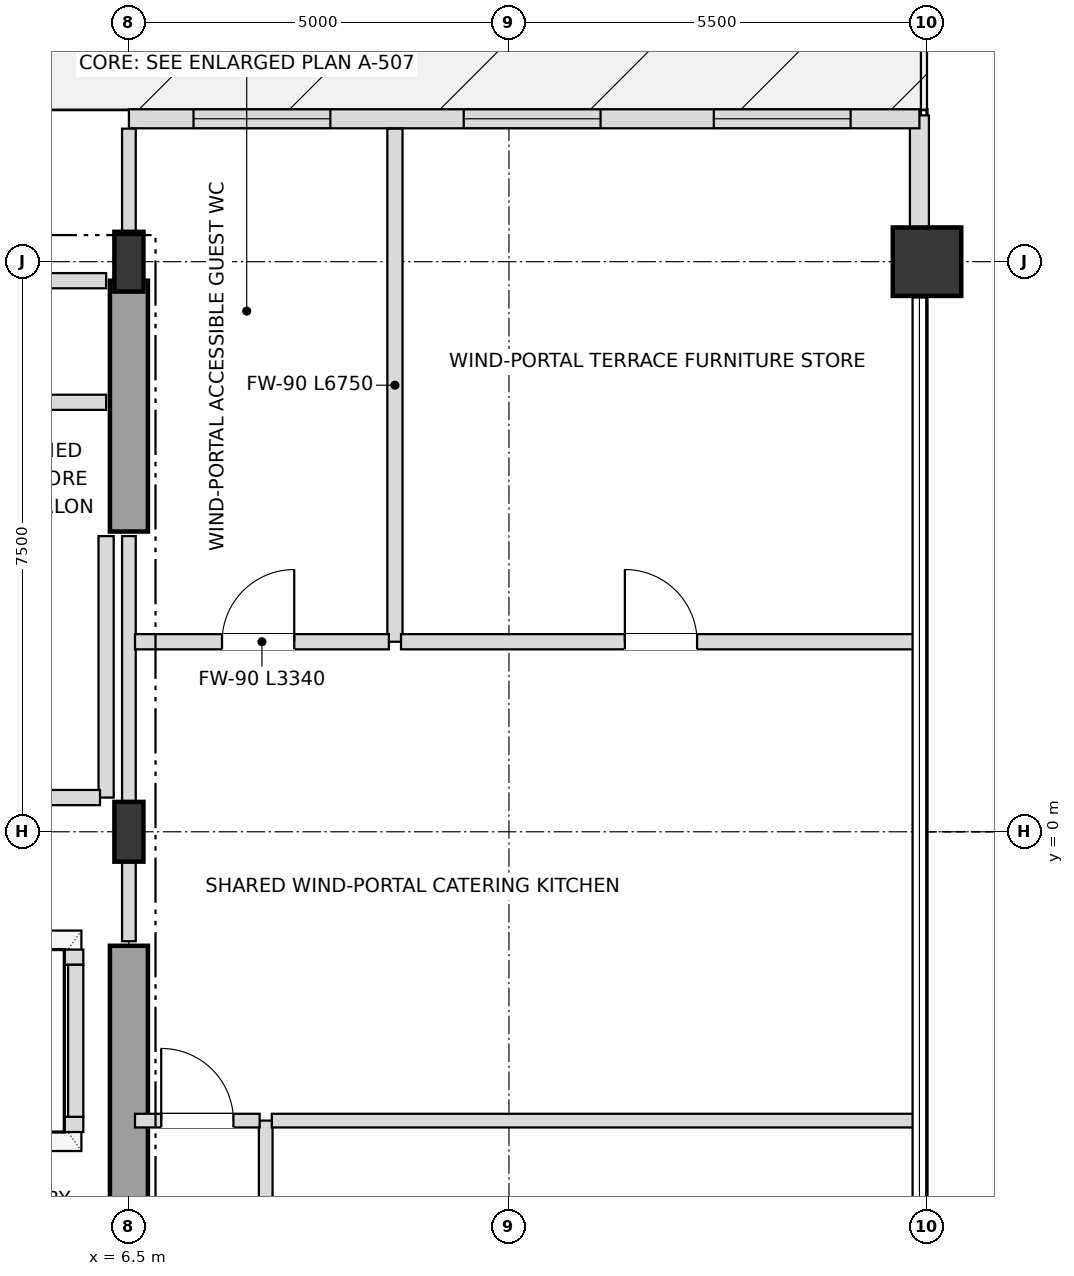
"""IFC4 building model, lengths in metres.
Left out: names, types, materials, properties, quantities, classifications, styles, units other than length and angle.
Written with IfcOpenShell. Run it as: python <this file> out.ifc"""

import sys

from ifc_helpers import new_model, si_unit, direction, frame, frame_2d, origin, origin_2d, place, context, subcontext, project, spatial, rectangle, i_section, extrude, element, fill, save


model = new_model("IFC4")
c1 = context("Model", 3, precision=1e-05, world=origin(), true_north=direction((0.0, 1.0)))
c2 = subcontext(c1, "Body", "Model", "MODEL_VIEW")
j1 = project(units=[si_unit("LENGTHUNIT", "METRE"), si_unit("PLANEANGLEUNIT", "RADIAN")], contexts=[c1])
p1 = place(None, origin())
s1 = spatial("IfcSite", under=j1, at=p1, CompositionType="ELEMENT")
p2 = place(p1, origin())
s2 = spatial("IfcBuilding", under=s1, at=p2, CompositionType="ELEMENT")
p3 = place(p2, frame((0.0, 0.0, 261.9)))
s3 = spatial("IfcBuildingStorey", under=s2, at=p3, CompositionType="ELEMENT", Elevation=261.9)
for number, where, z_axis, x_axis in (
    (1, (6.5, 0.0, 0.0), (0.0, 0.0, 1.0), (1.0, 0.0, 0.0)),
    (2, (6.5, 7.5, 0.0), (0.0, 0.0, 1.0), (1.0, 0.0, 0.0)),
):
    element("IfcColumn", number, at=place(p3, frame(where, z_axis=z_axis, x_axis=x_axis)), inside=s3, PredefinedType="COLUMN", context=c2, shape_type="SweptSolid", body=[
        extrude(i_section(OverallWidth=0.382, OverallDepth=0.786, WebThickness=0.02, FlangeThickness=0.033, at=origin_2d()), origin(), (0.0, 0.0, 1.0), 3.6),
    ])
p4 = place(p3, frame((17.0, 7.5, 0.0), z_axis=(0.0, 0.0, 1.0), x_axis=(1.0, 0.0, 0.0)))
e3 = element("IfcColumn", 3, at=p4, inside=s3, PredefinedType="USERDEFINED", context=c2, shape_type="SweptSolid", body=[
    extrude(rectangle(XDim=0.9, YDim=0.9, at=origin_2d()), origin(), (0.0, 0.0, 1.0), 3.6),
])
p5 = place(p3, frame((16.9, 7.945, 0.0), z_axis=(0.0, 0.0, 1.0), x_axis=(0.0, 1.0, 0.0)))
e4 = element("IfcWall", 4, at=p5, inside=s3, PredefinedType="SOLIDWALL", context=c2, shape_type="SweptSolid", body=[
    extrude(rectangle(XDim=1.48, YDim=0.25, at=frame_2d((0.74, 0.0))), origin(), (0.0, 0.0, 1.0), 2.748),
])
p6 = place(p3, frame((6.5, 9.38, 0.0), z_axis=(0.0, 0.0, 1.0), x_axis=(1.0, 0.0, 0.0)))
e5 = element("IfcWall", 5, at=p6, inside=s3, PredefinedType="SOLIDWALL", context=c2, shape_type="SweptSolid", body=[
    extrude(rectangle(XDim=10.4, YDim=0.25, at=frame_2d((5.2, 0.0))), origin(), (0.0, 0.0, 1.0), 3.38),
])
p7 = place(p6, frame((0.85, 0.0, 0.72)))
e6 = element("IfcOpeningElement", 6, at=p7, cuts=e5, PredefinedType="OPENING", context=c2, shape_type="SweptSolid", body=[
    extrude(rectangle(XDim=1.8, YDim=1.68, at=frame_2d((0.9, 0.84))), frame((0.0, 0.135, 0.0), z_axis=(0.0, -1.0, 0.0), x_axis=(1.0, 0.0, 0.0)), (0.0, 0.0, 1.0), 0.27),
])
p8 = place(p6, frame((4.405, 0.0, 0.72)))
e7 = element("IfcOpeningElement", 7, at=p8, cuts=e5, PredefinedType="OPENING", context=c2, shape_type="SweptSolid", body=[
    extrude(rectangle(XDim=1.8, YDim=1.68, at=frame_2d((0.9, 0.84))), frame((0.0, 0.135, 0.0), z_axis=(0.0, -1.0, 0.0), x_axis=(1.0, 0.0, 0.0)), (0.0, 0.0, 1.0), 0.27),
])
p9 = place(p6, frame((7.695, 0.0, 0.72)))
e8 = element("IfcOpeningElement", 8, at=p9, cuts=e5, PredefinedType="OPENING", context=c2, shape_type="SweptSolid", body=[
    extrude(rectangle(XDim=1.8, YDim=1.68, at=frame_2d((0.9, 0.84))), frame((0.0, 0.135, 0.0), z_axis=(0.0, -1.0, 0.0), x_axis=(1.0, 0.0, 0.0)), (0.0, 0.0, 1.0), 0.27),
])
p10 = place(p3, frame((6.5, -7.25, 0.0), z_axis=(0.0, 0.0, 1.0), x_axis=(0.0, 1.0, 0.0)))
e9 = element("IfcWall", 9, at=p10, inside=s3, PredefinedType="SHEAR", context=c2, shape_type="SweptSolid", body=[
    extrude(rectangle(XDim=5.75, YDim=0.5, at=frame_2d((2.875, 0.0))), origin(), (0.0, 0.0, 1.0), 3.38),
])
p11 = place(p10, frame((0.85, 0.0, 0.0)))
e10 = element("IfcOpeningElement", 10, at=p11, cuts=e9, PredefinedType="OPENING", context=c2, shape_type="SweptSolid", body=[
    extrude(rectangle(XDim=1.05, YDim=2.15, at=frame_2d((0.525, 1.075))), frame((0.0, 0.26, 0.0), z_axis=(0.0, -1.0, 0.0), x_axis=(1.0, 0.0, 0.0)), (0.0, 0.0, 1.0), 0.52),
])
p12 = place(p3, frame((6.5, 3.95, 0.0), z_axis=(0.0, 0.0, 1.0), x_axis=(0.0, 1.0, 0.0)))
e11 = element("IfcWall", 11, at=p12, inside=s3, PredefinedType="SHEAR", context=c2, shape_type="SweptSolid", body=[
    extrude(rectangle(XDim=3.3, YDim=0.5, at=frame_2d((1.65, 0.0))), origin(), (0.0, 0.0, 1.0), 3.38),
])
p13 = place(p3, frame((1.8, -3.85, 0.0), z_axis=(0.0, 0.0, 1.0), x_axis=(1.0, 0.0, 0.0)))
e12 = element("IfcWall", 12, at=p13, inside=s3, PredefinedType="SOLIDWALL", context=c2, shape_type="SweptSolid", body=[
    extrude(rectangle(XDim=4.1, YDim=0.2, at=frame_2d((2.05, 0.0))), origin(), (0.0, 0.0, 1.0), 3.38),
])
p14 = place(p13, frame((0.45, 0.0, 0.0)))
e13 = element("IfcOpeningElement", 13, at=p14, cuts=e12, PredefinedType="OPENING", context=c2, shape_type="SweptSolid", body=[
    extrude(rectangle(XDim=1.2, YDim=2.2, at=frame_2d((0.6, 1.1))), frame((0.0, 0.11, 0.0), z_axis=(0.0, -1.0, 0.0), x_axis=(1.0, 0.0, 0.0)), (0.0, 0.0, 1.0), 0.22),
])
p15 = place(p13, frame((2.45, 0.0, 0.0)))
e14 = element("IfcOpeningElement", 14, at=p15, cuts=e12, PredefinedType="OPENING", context=c2, shape_type="SweptSolid", body=[
    extrude(rectangle(XDim=1.2, YDim=2.2, at=frame_2d((0.6, 1.1))), frame((0.0, 0.11, 0.0), z_axis=(0.0, -1.0, 0.0), x_axis=(1.0, 0.0, 0.0)), (0.0, 0.0, 1.0), 0.22),
])
p16 = place(p3, frame((1.8, -1.65, 0.0), z_axis=(0.0, 0.0, 1.0), x_axis=(1.0, 0.0, 0.0)))
e15 = element("IfcWall", 15, at=p16, inside=s3, PredefinedType="SOLIDWALL", context=c2, shape_type="SweptSolid", body=[
    extrude(rectangle(XDim=4.1, YDim=0.2, at=frame_2d((2.05, 0.0))), origin(), (0.0, 0.0, 1.0), 3.38),
])
p17 = place(p3, frame((5.8, -3.75, 0.0), z_axis=(0.0, 0.0, 1.0), x_axis=(0.0, 1.0, 0.0)))
e16 = element("IfcWall", 16, at=p17, inside=s3, PredefinedType="SOLIDWALL", context=c2, shape_type="SweptSolid", body=[
    extrude(rectangle(XDim=2.0, YDim=0.2, at=frame_2d((1.0, 0.0))), origin(), (0.0, 0.0, 1.0), 3.38),
])
p18 = place(p3, frame((6.2, 0.45, 0.0), z_axis=(0.0, 0.0, 1.0), x_axis=(0.0, 1.0, 0.0)))
e17 = element("IfcWall", 17, at=p18, inside=s3, PredefinedType="SOLIDWALL", context=c2, shape_type="SweptSolid", body=[
    extrude(rectangle(XDim=3.44, YDim=0.2, at=frame_2d((1.72, 0.0))), origin(), (0.0, 0.0, 1.0), 3.38),
])
p19 = place(p3, frame((6.5, -1.44, 0.0), z_axis=(0.0, 0.0, 1.0), x_axis=(0.0, 1.0, 0.0)))
e18 = element("IfcWall", 18, at=p19, inside=s3, PredefinedType="PARTITIONING", context=c2, shape_type="SweptSolid", body=[
    extrude(rectangle(XDim=5.33, YDim=0.18, at=frame_2d((2.665, 0.0))), origin(), (0.0, 0.0, 1.0), 2.826),
])
p20 = place(p3, frame((6.5, 7.31, 0.0), z_axis=(0.0, 0.0, 1.0), x_axis=(0.0, 1.0, 0.0)))
e19 = element("IfcWall", 19, at=p20, inside=s3, PredefinedType="PARTITIONING", context=c2, shape_type="SweptSolid", body=[
    extrude(rectangle(XDim=1.94, YDim=0.18, at=frame_2d((0.97, 0.0))), origin(), (0.0, 0.0, 1.0), 2.826),
])
p21 = place(p3, frame((8.3, -9.2, 0.0), z_axis=(0.0, 0.0, 1.0), x_axis=(0.0, 1.0, 0.0)))
e20 = element("IfcWall", 20, at=p21, inside=s3, PredefinedType="PARTITIONING", context=c2, shape_type="SweptSolid", body=[
    extrude(rectangle(XDim=5.4, YDim=0.18, at=frame_2d((2.7, 0.0))), origin(), (0.0, 0.0, 1.0), 2.826),
])
p22 = place(p21, frame((3.125, 0.0, 0.0)))
e21 = element("IfcOpeningElement", 21, at=p22, cuts=e20, PredefinedType="OPENING", context=c2, shape_type="SweptSolid", body=[
    extrude(rectangle(XDim=0.95, YDim=2.15, at=frame_2d((0.475, 1.075))), frame((0.0, 0.1, 0.0), z_axis=(0.0, -1.0, 0.0), x_axis=(1.0, 0.0, 0.0)), (0.0, 0.0, 1.0), 0.2),
])
p23 = place(p3, frame((10.0, 2.5, 0.0), z_axis=(0.0, 0.0, 1.0), x_axis=(0.0, 1.0, 0.0)))
e22 = element("IfcWall", 22, at=p23, inside=s3, PredefinedType="SOLIDWALL", context=c2, shape_type="SweptSolid", body=[
    extrude(rectangle(XDim=6.75, YDim=0.2, at=frame_2d((3.375, 0.0))), origin(), (0.0, 0.0, 1.0), 2.826),
])
p24 = place(p3, frame((6.58, -3.8, 0.0), z_axis=(0.0, 0.0, 1.0), x_axis=(1.0, 0.0, 0.0)))
e23 = element("IfcWall", 23, at=p24, inside=s3, PredefinedType="PARTITIONING", context=c2, shape_type="SweptSolid", body=[
    extrude(rectangle(XDim=1.64, YDim=0.18, at=frame_2d((0.82, 0.0))), origin(), (0.0, 0.0, 1.0), 3.38),
])
p25 = place(p24, frame((0.345, 0.0, 0.0)))
e24 = element("IfcOpeningElement", 24, at=p25, cuts=e23, PredefinedType="OPENING", context=c2, shape_type="SweptSolid", body=[
    extrude(rectangle(XDim=0.95, YDim=2.15, at=frame_2d((0.475, 1.075))), frame((0.0, 0.1, 0.0), z_axis=(0.0, -1.0, 0.0), x_axis=(1.0, 0.0, 0.0)), (0.0, 0.0, 1.0), 0.2),
])
p26 = place(p3, frame((8.38, -3.8, 0.0), z_axis=(0.0, 0.0, 1.0), x_axis=(1.0, 0.0, 0.0)))
e25 = element("IfcWall", 25, at=p26, inside=s3, PredefinedType="PARTITIONING", context=c2, shape_type="SweptSolid", body=[
    extrude(rectangle(XDim=8.44, YDim=0.18, at=frame_2d((4.22, 0.0))), origin(), (0.0, 0.0, 1.0), 3.018),
])
p27 = place(p3, frame((4.13, 0.45, 0.0), z_axis=(0.0, 0.0, 1.0), x_axis=(1.0, 0.0, 0.0)))
e26 = element("IfcWall", 26, at=p27, inside=s3, PredefinedType="SOLIDWALL", context=c2, shape_type="SweptSolid", body=[
    extrude(rectangle(XDim=1.99, YDim=0.2, at=frame_2d((0.995, 0.0))), origin(), (0.0, 0.0, 1.0), 3.38),
])
p28 = place(p3, frame((6.58, 2.5, 0.0), z_axis=(0.0, 0.0, 1.0), x_axis=(1.0, 0.0, 0.0)))
e27 = element("IfcWall", 27, at=p28, inside=s3, PredefinedType="SOLIDWALL", context=c2, shape_type="SweptSolid", body=[
    extrude(rectangle(XDim=3.34, YDim=0.2, at=frame_2d((1.67, 0.0))), origin(), (0.0, 0.0, 1.0), 3.38),
])
p29 = place(p28, frame((1.145, 0.0, 0.0)))
e28 = element("IfcOpeningElement", 28, at=p29, cuts=e27, PredefinedType="OPENING", context=c2, shape_type="SweptSolid", body=[
    extrude(rectangle(XDim=0.95, YDim=2.15, at=frame_2d((0.475, 1.075))), frame((0.0, 0.11, 0.0), z_axis=(0.0, -1.0, 0.0), x_axis=(1.0, 0.0, 0.0)), (0.0, 0.0, 1.0), 0.22),
])
p30 = place(p3, frame((10.08, 2.5, 0.0), z_axis=(0.0, 0.0, 1.0), x_axis=(1.0, 0.0, 0.0)))
e29 = element("IfcWall", 29, at=p30, inside=s3, PredefinedType="SOLIDWALL", context=c2, shape_type="SweptSolid", body=[
    extrude(rectangle(XDim=6.74, YDim=0.2, at=frame_2d((3.37, 0.0))), origin(), (0.0, 0.0, 1.0), 3.018),
])
p31 = place(p30, frame((2.945, 0.0, 0.0)))
e30 = element("IfcOpeningElement", 30, at=p31, cuts=e29, PredefinedType="OPENING", context=c2, shape_type="SweptSolid", body=[
    extrude(rectangle(XDim=0.95, YDim=2.15, at=frame_2d((0.475, 1.075))), frame((0.0, 0.11, 0.0), z_axis=(0.0, -1.0, 0.0), x_axis=(1.0, 0.0, 0.0)), (0.0, 0.0, 1.0), 0.22),
])
for number, where, z_axis, x_axis in (
    (31, (4.13, 5.65, 0.0), (0.0, 0.0, 1.0), (1.0, 0.0, 0.0)),
    (32, (4.13, 7.25, 0.0), (0.0, 0.0, 1.0), (1.0, 0.0, 0.0)),
):
    element("IfcWall", number, at=place(p3, frame(where, z_axis=z_axis, x_axis=x_axis)), inside=s3, PredefinedType="SOLIDWALL", context=c2, shape_type="SweptSolid", body=[
        extrude(rectangle(XDim=2.07, YDim=0.2, at=frame_2d((1.035, 0.0))), origin(), (0.0, 0.0, 1.0), 3.38),
    ])
p32 = place(p7, origin())
e33 = element("IfcWindow", 33, at=p32, inside=s3, PartitioningType="SINGLE_PANEL", PredefinedType="WINDOW", context=c2, shape_type="SweptSolid", body=[
    extrude(rectangle(XDim=1.8, YDim=1.68, at=frame_2d((0.9, 0.84))), frame((0.0, 0.03, 0.0), z_axis=(0.0, -1.0, 0.0), x_axis=(1.0, 0.0, 0.0)), (0.0, 0.0, 1.0), 0.06),
])
fill(e6, e33)
p33 = place(p8, origin())
e34 = element("IfcWindow", 34, at=p33, inside=s3, PartitioningType="SINGLE_PANEL", PredefinedType="WINDOW", context=c2, shape_type="SweptSolid", body=[
    extrude(rectangle(XDim=1.8, YDim=1.68, at=frame_2d((0.9, 0.84))), frame((0.0, 0.03, 0.0), z_axis=(0.0, -1.0, 0.0), x_axis=(1.0, 0.0, 0.0)), (0.0, 0.0, 1.0), 0.06),
])
fill(e7, e34)
p34 = place(p9, origin())
e35 = element("IfcWindow", 35, at=p34, inside=s3, PartitioningType="SINGLE_PANEL", PredefinedType="WINDOW", context=c2, shape_type="SweptSolid", body=[
    extrude(rectangle(XDim=1.8, YDim=1.68, at=frame_2d((0.9, 0.84))), frame((0.0, 0.03, 0.0), z_axis=(0.0, -1.0, 0.0), x_axis=(1.0, 0.0, 0.0)), (0.0, 0.0, 1.0), 0.06),
])
fill(e8, e35)
p35 = place(p25, origin())
e36 = element("IfcDoor", 36, at=p35, inside=s3, OperationType="SINGLE_SWING_LEFT", PredefinedType="DOOR", context=c2, shape_type="SweptSolid", body=[
    extrude(rectangle(XDim=0.95, YDim=2.15, at=frame_2d((0.475, 1.075))), frame((0.0, 0.025, 0.0), z_axis=(0.0, -1.0, 0.0), x_axis=(1.0, 0.0, 0.0)), (0.0, 0.0, 1.0), 0.05),
])
fill(e24, e36)
p36 = place(p29, origin())
e37 = element("IfcDoor", 37, at=p36, inside=s3, OperationType="SINGLE_SWING_RIGHT", PredefinedType="DOOR", context=c2, shape_type="SweptSolid", body=[
    extrude(rectangle(XDim=0.95, YDim=2.15, at=frame_2d((0.475, 1.075))), frame((0.0, 0.025, 0.0), z_axis=(0.0, -1.0, 0.0), x_axis=(1.0, 0.0, 0.0)), (0.0, 0.0, 1.0), 0.05),
])
fill(e28, e37)
p37 = place(p31, origin())
e38 = element("IfcDoor", 38, at=p37, inside=s3, OperationType="SINGLE_SWING_LEFT", PredefinedType="DOOR", context=c2, shape_type="SweptSolid", body=[
    extrude(rectangle(XDim=0.95, YDim=2.15, at=frame_2d((0.475, 1.075))), frame((0.0, 0.025, 0.0), z_axis=(0.0, -1.0, 0.0), x_axis=(1.0, 0.0, 0.0)), (0.0, 0.0, 1.0), 0.05),
])
fill(e30, e38)
save(model, sys.argv[1])
